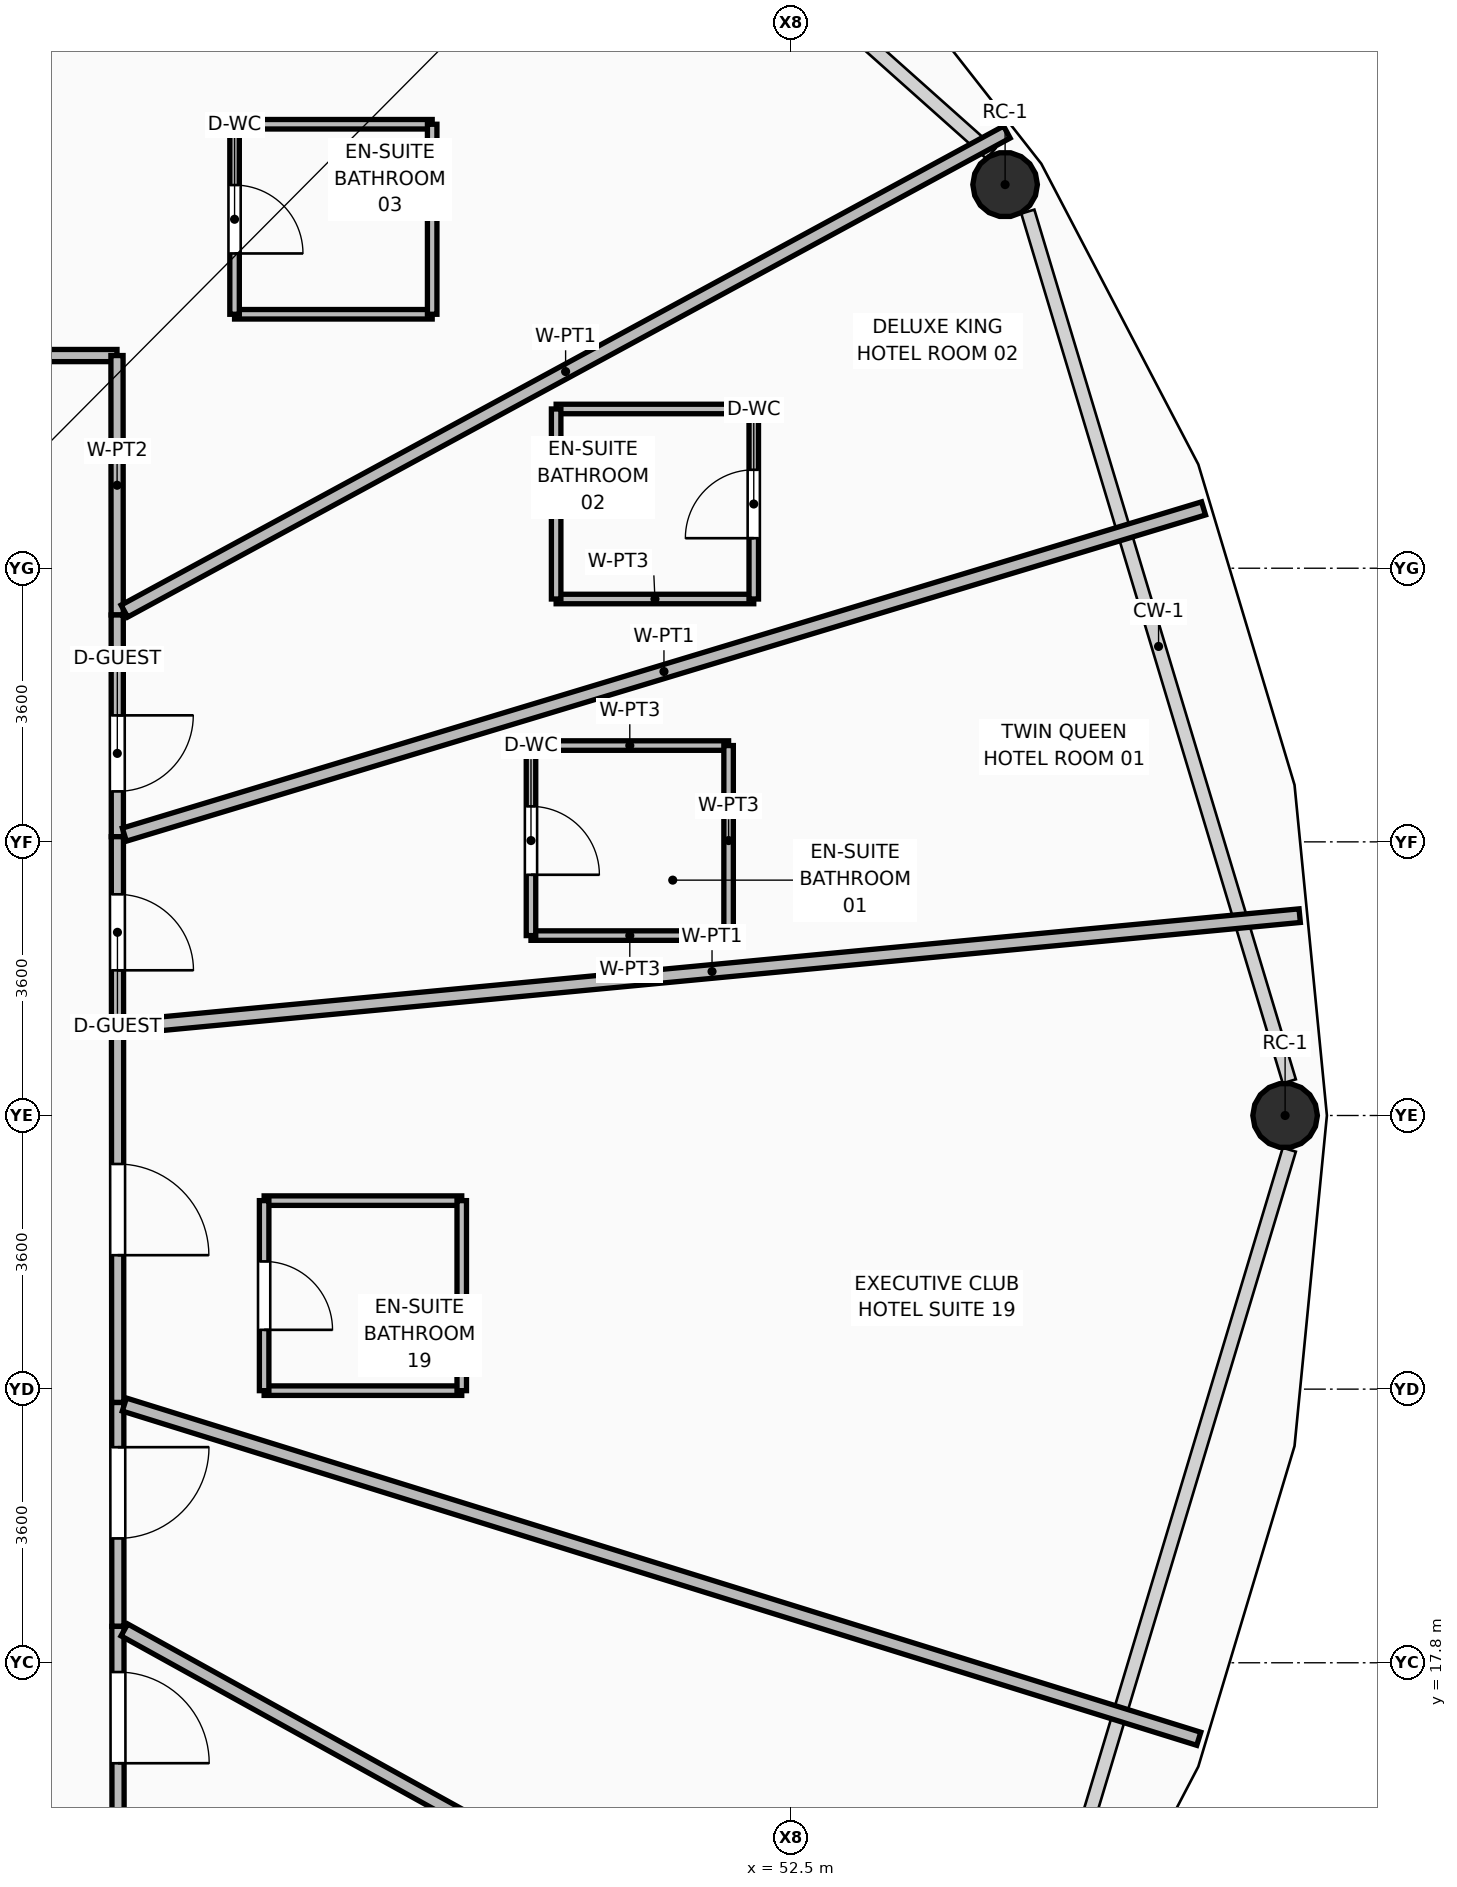
"""IFC4 building model, lengths in metres.
Left out: names, types, materials, properties, quantities, classifications, styles, units other than length and angle.
Written with IfcOpenShell. Run it as: python <this file> out.ifc"""

import sys

from ifc_helpers import new_model, si_unit, direction, frame, frame_2d, origin, origin_2d, place, context, subcontext, project, spatial, rectangle, hollow_circle, extrude, element, fill, save


model = new_model("IFC4")
c1 = context("Model", 3, precision=1e-05, world=origin(), true_north=direction((0.0, 1.0)))
c2 = subcontext(c1, "Body", "Model", "MODEL_VIEW")
j1 = project(units=[si_unit("LENGTHUNIT", "METRE"), si_unit("PLANEANGLEUNIT", "RADIAN")], contexts=[c1])
p1 = place(None, origin())
s1 = spatial("IfcSite", under=j1, at=p1, CompositionType="ELEMENT")
p2 = place(p1, origin())
s2 = spatial("IfcBuilding", under=s1, at=p2, CompositionType="ELEMENT")
p3 = place(p2, frame((0.0, 0.0, 83.25)))
s3 = spatial("IfcBuildingStorey", under=s2, at=p3, CompositionType="ELEMENT", Elevation=83.25)
for number, where, z_axis, x_axis in (
    (1, (59.0, 25.0, 0.0), (0.0, 0.0, 1.0), (1.0, 0.0, 0.0)),
    (2, (55.316, 37.247, 0.0), (0.0, 0.0, 1.0), (1.0, 0.0, 0.0)),
):
    element("IfcColumn", number, at=place(p3, frame(where, z_axis=z_axis, x_axis=x_axis)), inside=s3, PredefinedType="COLUMN", context=c2, shape_type="SweptSolid", body=[
        extrude(hollow_circle(Radius=0.425, WallThickness=0.04, at=origin_2d()), origin(), (0.0, 0.0, 1.0), 3.57),
    ])
p4 = place(p3, frame((38.966, 34.998, 0.0), z_axis=(0.0, 0.0, 1.0), x_axis=(1.0, 0.0, 0.0)))
e3 = element("IfcWall", 3, at=p4, inside=s3, PredefinedType="PARTITIONING", context=c2, shape_type="SweptSolid", body=[
    extrude(rectangle(XDim=4.665, YDim=0.16, at=frame_2d((2.333, 0.0))), origin(), (0.0, 0.0, 1.0), 2.928),
])
p5 = place(p4, frame((0.609, 0.0, 0.0)))
e4 = element("IfcOpeningElement", 4, at=p5, cuts=e3, PredefinedType="OPENING", context=c2, shape_type="SweptSolid", body=[
    extrude(rectangle(XDim=1.2, YDim=2.1, at=frame_2d((0.6, 1.05))), frame((0.0, 0.09, 0.0), z_axis=(0.0, -1.0, 0.0), x_axis=(1.0, 0.0, 0.0)), (0.0, 0.0, 1.0), 0.18),
])
p6 = place(p3, frame((43.631, 34.998, 0.0), z_axis=(0.0, 0.0, 1.0), x_axis=(0.000858368782, -0.999999631601, 0.0)))
e5 = element("IfcWall", 5, at=p6, inside=s3, PredefinedType="PARTITIONING", context=c2, shape_type="SweptSolid", body=[
    extrude(rectangle(XDim=3.413, YDim=0.16, at=frame_2d((1.707, 0.0))), origin(), (0.0, 0.0, 1.0), 2.928),
])
p7 = place(p3, frame((43.634, 31.585, 0.0), z_axis=(0.0, 0.0, 1.0), x_axis=(0.000669567978, -0.999999775839, 0.0)))
e6 = element("IfcWall", 6, at=p7, inside=s3, PredefinedType="PARTITIONING", context=c2, shape_type="SweptSolid", body=[
    extrude(rectangle(XDim=2.917, YDim=0.16, at=frame_2d((1.458, 0.0))), origin(), (0.0, 0.0, 1.0), 3.55),
])
p8 = place(p7, frame((1.321, 0.0, 0.0)))
e7 = element("IfcOpeningElement", 7, at=p8, cuts=e6, PredefinedType="OPENING", context=c2, shape_type="SweptSolid", body=[
    extrude(rectangle(XDim=1.0, YDim=2.1, at=frame_2d((0.5, 1.05))), frame((0.0, 0.09, 0.0), z_axis=(0.0, -1.0, 0.0), x_axis=(1.0, 0.0, 0.0)), (0.0, 0.0, 1.0), 0.18),
])
p9 = place(p3, frame((43.636, 28.668, 0.0), z_axis=(0.0, 0.0, 1.0), x_axis=(0.00077632194, -0.999999698662, 0.0)))
e8 = element("IfcWall", 8, at=p9, inside=s3, PredefinedType="PARTITIONING", context=c2, shape_type="SweptSolid", body=[
    extrude(rectangle(XDim=2.516, YDim=0.16, at=frame_2d((1.258, 0.0))), origin(), (0.0, 0.0, 1.0), 3.55),
])
p10 = place(p9, frame((0.758, 0.0, 0.0)))
e9 = element("IfcOpeningElement", 9, at=p10, cuts=e8, PredefinedType="OPENING", context=c2, shape_type="SweptSolid", body=[
    extrude(rectangle(XDim=1.0, YDim=2.1, at=frame_2d((0.5, 1.05))), frame((0.0, 0.09, 0.0), z_axis=(0.0, -1.0, 0.0), x_axis=(1.0, 0.0, 0.0)), (0.0, 0.0, 1.0), 0.18),
])
p11 = place(p3, frame((43.638, 26.152, 0.0), z_axis=(0.0, 0.0, 1.0), x_axis=(0.000644042472, -0.999999792605, 0.0)))
e10 = element("IfcWall", 10, at=p11, inside=s3, PredefinedType="PARTITIONING", context=c2, shape_type="SweptSolid", body=[
    extrude(rectangle(XDim=4.928, YDim=0.16, at=frame_2d((2.464, 0.0))), origin(), (0.0, 0.0, 1.0), 2.928),
])
p12 = place(p11, frame((1.79, 0.0, 0.0)))
e11 = element("IfcOpeningElement", 11, at=p12, cuts=e10, PredefinedType="OPENING", context=c2, shape_type="SweptSolid", body=[
    extrude(rectangle(XDim=1.2, YDim=2.1, at=frame_2d((0.6, 1.05))), frame((0.0, 0.09, 0.0), z_axis=(0.0, -1.0, 0.0), x_axis=(1.0, 0.0, 0.0)), (0.0, 0.0, 1.0), 0.18),
])
p13 = place(p3, frame((43.641, 21.224, 0.0), z_axis=(0.0, 0.0, 1.0), x_axis=(0.0006631848, -0.999999780093, 0.0)))
e12 = element("IfcWall", 12, at=p13, inside=s3, PredefinedType="PARTITIONING", context=c2, shape_type="SweptSolid", body=[
    extrude(rectangle(XDim=2.945, YDim=0.16, at=frame_2d((1.473, 0.0))), origin(), (0.0, 0.0, 1.0), 2.928),
])
p14 = place(p13, frame((0.588, 0.0, 0.0)))
e13 = element("IfcOpeningElement", 13, at=p14, cuts=e12, PredefinedType="OPENING", context=c2, shape_type="SweptSolid", body=[
    extrude(rectangle(XDim=1.2, YDim=2.1, at=frame_2d((0.6, 1.05))), frame((0.0, 0.09, 0.0), z_axis=(0.0, -1.0, 0.0), x_axis=(1.0, 0.0, 0.0)), (0.0, 0.0, 1.0), 0.18),
])
p15 = place(p3, frame((43.643, 18.279, 0.0), z_axis=(0.0, 0.0, 1.0), x_axis=(0.000756429436, -0.999999713907, 0.0)))
e14 = element("IfcWall", 14, at=p15, inside=s3, PredefinedType="PARTITIONING", context=c2, shape_type="SweptSolid", body=[
    extrude(rectangle(XDim=3.873, YDim=0.16, at=frame_2d((1.937, 0.0))), origin(), (0.0, 0.0, 1.0), 2.928),
])
p16 = place(p15, frame((0.601, 0.0, 0.0)))
e15 = element("IfcOpeningElement", 15, at=p16, cuts=e14, PredefinedType="OPENING", context=c2, shape_type="SweptSolid", body=[
    extrude(rectangle(XDim=1.2, YDim=2.1, at=frame_2d((0.6, 1.05))), frame((0.0, 0.09, 0.0), z_axis=(0.0, -1.0, 0.0), x_axis=(1.0, 0.0, 0.0)), (0.0, 0.0, 1.0), 0.18),
])
p17 = place(p3, frame((43.728, 26.161, 0.0), z_axis=(0.0, 0.0, 1.0), x_axis=(0.995524176843, 0.094507213062, 0.0)))
e16 = element("IfcWall", 16, at=p17, inside=s3, PredefinedType="PARTITIONING", context=c2, shape_type="SweptSolid", body=[
    extrude(rectangle(XDim=15.533, YDim=0.18, at=frame_2d((7.767, 0.0))), origin(), (0.0, 0.0, 1.0), 2.775),
])
p18 = place(p3, frame((43.728, 28.695, 0.0), z_axis=(0.0, 0.0, 1.0), x_axis=(0.957224891777, 0.289344961183, 0.0)))
e17 = element("IfcWall", 17, at=p18, inside=s3, PredefinedType="PARTITIONING", context=c2, shape_type="SweptSolid", body=[
    extrude(rectangle(XDim=14.833, YDim=0.18, at=frame_2d((7.417, 0.0))), origin(), (0.0, 0.0, 1.0), 2.775),
])
p19 = place(p3, frame((43.728, 31.636, 0.0), z_axis=(0.0, 0.0, 1.0), x_axis=(0.878890179317, 0.477024163643, 0.0)))
e18 = element("IfcWall", 18, at=p19, inside=s3, PredefinedType="PARTITIONING", context=c2, shape_type="SweptSolid", body=[
    extrude(rectangle(XDim=13.211, YDim=0.18, at=frame_2d((6.605, 0.0))), origin(), (0.0, 0.0, 1.0), 2.775),
])
p20 = place(p3, frame((39.026, 35.078, 0.0), z_axis=(0.0, 0.0, 1.0), x_axis=(0.598366758348, 0.801222330258, 0.0)))
e19 = element("IfcWall", 19, at=p20, inside=s3, PredefinedType="PARTITIONING", context=c2, shape_type="SweptSolid", body=[
    extrude(rectangle(XDim=13.236, YDim=0.18, at=frame_2d((6.618, 0.0))), origin(), (0.0, 0.0, 1.0), 2.775),
])
p21 = place(p3, frame((43.728, 18.232, 0.0), z_axis=(0.0, 0.0, 1.0), x_axis=(0.874929134989, -0.484250977022, 0.0)))
e20 = element("IfcWall", 20, at=p21, inside=s3, PredefinedType="PARTITIONING", context=c2, shape_type="SweptSolid", body=[
    extrude(rectangle(XDim=13.111, YDim=0.18, at=frame_2d((6.555, 0.0))), origin(), (0.0, 0.0, 1.0), 2.775),
])
p22 = place(p3, frame((43.728, 21.197, 0.0), z_axis=(0.0, 0.0, 1.0), x_axis=(0.954873823144, -0.297011753766, 0.0)))
e21 = element("IfcWall", 21, at=p22, inside=s3, PredefinedType="PARTITIONING", context=c2, shape_type="SweptSolid", body=[
    extrude(rectangle(XDim=14.804, YDim=0.18, at=frame_2d((7.402, 0.0))), origin(), (0.0, 0.0, 1.0), 2.775),
])
for number, where, z_axis, x_axis in (
    (22, (49.078, 27.367, 0.0), (0.0, 0.0, 1.0), (1.0, 0.0, 0.0)),
    (23, (49.078, 29.867, 0.0), (0.0, 0.0, 1.0), (1.0, 0.0, 0.0)),
):
    element("IfcWall", number, at=place(p3, frame(where, z_axis=z_axis, x_axis=x_axis)), inside=s3, PredefinedType="PARTITIONING", context=c2, shape_type="SweptSolid", body=[
        extrude(rectangle(XDim=2.6, YDim=0.125, at=frame_2d((1.3, 0.0))), origin(), (0.0, 0.0, 1.0), 3.55),
    ])
p23 = place(p3, frame((49.078, 27.367, 0.0), z_axis=(0.0, 0.0, 1.0), x_axis=(0.0, 1.0, 0.0)))
e24 = element("IfcWall", 24, at=p23, inside=s3, PredefinedType="PARTITIONING", context=c2, shape_type="SweptSolid", body=[
    extrude(rectangle(XDim=2.5, YDim=0.125, at=frame_2d((1.25, 0.0))), origin(), (0.0, 0.0, 1.0), 3.55),
])
p24 = place(p23, frame((0.8, 0.0, 0.0)))
e25 = element("IfcOpeningElement", 25, at=p24, cuts=e24, PredefinedType="OPENING", context=c2, shape_type="SweptSolid", body=[
    extrude(rectangle(XDim=0.9, YDim=2.1, at=frame_2d((0.45, 1.05))), frame((0.0, 0.073, 0.0), z_axis=(0.0, -1.0, 0.0), x_axis=(1.0, 0.0, 0.0)), (0.0, 0.0, 1.0), 0.145),
])
p25 = place(p3, frame((51.678, 27.367, 0.0), z_axis=(0.0, 0.0, 1.0), x_axis=(0.0, 1.0, 0.0)))
e26 = element("IfcWall", 26, at=p25, inside=s3, PredefinedType="PARTITIONING", context=c2, shape_type="SweptSolid", body=[
    extrude(rectangle(XDim=2.5, YDim=0.125, at=frame_2d((1.25, 0.0))), origin(), (0.0, 0.0, 1.0), 3.55),
])
for number, where, z_axis, x_axis in (
    (27, (49.409, 31.795, 0.0), (0.0, 0.0, 1.0), (1.0, 0.0, 0.0)),
    (28, (49.409, 34.295, 0.0), (0.0, 0.0, 1.0), (1.0, 0.0, 0.0)),
):
    element("IfcWall", number, at=place(p3, frame(where, z_axis=z_axis, x_axis=x_axis)), inside=s3, PredefinedType="PARTITIONING", context=c2, shape_type="SweptSolid", body=[
        extrude(rectangle(XDim=2.6, YDim=0.125, at=frame_2d((1.3, 0.0))), origin(), (0.0, 0.0, 1.0), 3.55),
    ])
p26 = place(p3, frame((49.409, 31.795, 0.0), z_axis=(0.0, 0.0, 1.0), x_axis=(0.0, 1.0, 0.0)))
e29 = element("IfcWall", 29, at=p26, inside=s3, PredefinedType="PARTITIONING", context=c2, shape_type="SweptSolid", body=[
    extrude(rectangle(XDim=2.5, YDim=0.125, at=frame_2d((1.25, 0.0))), origin(), (0.0, 0.0, 1.0), 3.55),
])
p27 = place(p3, frame((52.009, 31.795, 0.0), z_axis=(0.0, 0.0, 1.0), x_axis=(0.0, 1.0, 0.0)))
e30 = element("IfcWall", 30, at=p27, inside=s3, PredefinedType="PARTITIONING", context=c2, shape_type="SweptSolid", body=[
    extrude(rectangle(XDim=2.5, YDim=0.125, at=frame_2d((1.25, 0.0))), origin(), (0.0, 0.0, 1.0), 3.55),
])
p28 = place(p27, frame((0.8, 0.0, 0.0)))
e31 = element("IfcOpeningElement", 31, at=p28, cuts=e30, PredefinedType="OPENING", context=c2, shape_type="SweptSolid", body=[
    extrude(rectangle(XDim=0.9, YDim=2.1, at=frame_2d((0.45, 1.05))), frame((0.0, 0.073, 0.0), z_axis=(0.0, -1.0, 0.0), x_axis=(1.0, 0.0, 0.0)), (0.0, 0.0, 1.0), 0.145),
])
for number, where, z_axis, x_axis in (
    (32, (45.178, 35.541, 0.0), (0.0, 0.0, 1.0), (1.0, 0.0, 0.0)),
    (33, (45.178, 38.041, 0.0), (0.0, 0.0, 1.0), (1.0, 0.0, 0.0)),
):
    element("IfcWall", number, at=place(p3, frame(where, z_axis=z_axis, x_axis=x_axis)), inside=s3, PredefinedType="PARTITIONING", context=c2, shape_type="SweptSolid", body=[
        extrude(rectangle(XDim=2.6, YDim=0.125, at=frame_2d((1.3, 0.0))), origin(), (0.0, 0.0, 1.0), 3.55),
    ])
p29 = place(p3, frame((45.178, 35.541, 0.0), z_axis=(0.0, 0.0, 1.0), x_axis=(0.0, 1.0, 0.0)))
e34 = element("IfcWall", 34, at=p29, inside=s3, PredefinedType="PARTITIONING", context=c2, shape_type="SweptSolid", body=[
    extrude(rectangle(XDim=2.5, YDim=0.125, at=frame_2d((1.25, 0.0))), origin(), (0.0, 0.0, 1.0), 3.55),
])
p30 = place(p29, frame((0.8, 0.0, 0.0)))
e35 = element("IfcOpeningElement", 35, at=p30, cuts=e34, PredefinedType="OPENING", context=c2, shape_type="SweptSolid", body=[
    extrude(rectangle(XDim=0.9, YDim=2.1, at=frame_2d((0.45, 1.05))), frame((0.0, 0.073, 0.0), z_axis=(0.0, -1.0, 0.0), x_axis=(1.0, 0.0, 0.0)), (0.0, 0.0, 1.0), 0.145),
])
p31 = place(p3, frame((47.778, 35.541, 0.0), z_axis=(0.0, 0.0, 1.0), x_axis=(0.0, 1.0, 0.0)))
e36 = element("IfcWall", 36, at=p31, inside=s3, PredefinedType="PARTITIONING", context=c2, shape_type="SweptSolid", body=[
    extrude(rectangle(XDim=2.5, YDim=0.125, at=frame_2d((1.25, 0.0))), origin(), (0.0, 0.0, 1.0), 3.55),
])
p32 = place(p3, frame((45.567, 21.38, 0.0), z_axis=(0.0, 0.0, 1.0), x_axis=(1.0, 0.0, 0.0)))
e37 = element("IfcWall", 37, at=p32, inside=s3, PredefinedType="PARTITIONING", context=c2, shape_type="SweptSolid", body=[
    extrude(rectangle(XDim=2.6, YDim=0.125, at=frame_2d((1.3, 0.0))), origin(), (0.0, 0.0, 1.0), 2.928),
])
p33 = place(p3, frame((45.567, 23.88, 0.0), z_axis=(0.0, 0.0, 1.0), x_axis=(1.0, 0.0, 0.0)))
e38 = element("IfcWall", 38, at=p33, inside=s3, PredefinedType="PARTITIONING", context=c2, shape_type="SweptSolid", body=[
    extrude(rectangle(XDim=2.6, YDim=0.125, at=frame_2d((1.3, 0.0))), origin(), (0.0, 0.0, 1.0), 3.55),
])
p34 = place(p3, frame((45.567, 21.38, 0.0), z_axis=(0.0, 0.0, 1.0), x_axis=(0.0, 1.0, 0.0)))
e39 = element("IfcWall", 39, at=p34, inside=s3, PredefinedType="PARTITIONING", context=c2, shape_type="SweptSolid", body=[
    extrude(rectangle(XDim=2.5, YDim=0.125, at=frame_2d((1.25, 0.0))), origin(), (0.0, 0.0, 1.0), 2.928),
])
p35 = place(p34, frame((0.8, 0.0, 0.0)))
e40 = element("IfcOpeningElement", 40, at=p35, cuts=e39, PredefinedType="OPENING", context=c2, shape_type="SweptSolid", body=[
    extrude(rectangle(XDim=0.9, YDim=2.1, at=frame_2d((0.45, 1.05))), frame((0.0, 0.073, 0.0), z_axis=(0.0, -1.0, 0.0), x_axis=(1.0, 0.0, 0.0)), (0.0, 0.0, 1.0), 0.145),
])
p36 = place(p3, frame((48.167, 21.38, 0.0), z_axis=(0.0, 0.0, 1.0), x_axis=(0.0, 1.0, 0.0)))
e41 = element("IfcWall", 41, at=p36, inside=s3, PredefinedType="PARTITIONING", context=c2, shape_type="SweptSolid", body=[
    extrude(rectangle(XDim=2.5, YDim=0.125, at=frame_2d((1.25, 0.0))), origin(), (0.0, 0.0, 1.0), 2.928),
])
p37 = place(p24, frame((0.9, 0.0, 0.0), z_axis=(0.0, 0.0, 1.0), x_axis=(-1.0, 0.0, 0.0)))
e42 = element("IfcDoor", 42, at=p37, inside=s3, OperationType="SINGLE_SWING_RIGHT", PredefinedType="DOOR", context=c2, shape_type="SweptSolid", body=[
    extrude(rectangle(XDim=0.9, YDim=2.1, at=frame_2d((0.45, 1.05))), frame((0.0, 0.025, 0.0), z_axis=(0.0, -1.0, 0.0), x_axis=(1.0, 0.0, 0.0)), (0.0, 0.0, 1.0), 0.05),
])
fill(e25, e42)
p38 = place(p10, origin())
e43 = element("IfcDoor", 43, at=p38, inside=s3, OperationType="SINGLE_SWING_RIGHT", PredefinedType="DOOR", context=c2, shape_type="SweptSolid", body=[
    extrude(rectangle(XDim=1.0, YDim=2.1, at=frame_2d((0.5, 1.05))), frame((0.0, 0.025, 0.0), z_axis=(0.0, -1.0, 0.0), x_axis=(1.0, 0.0, 0.0)), (0.0, 0.0, 1.0), 0.05),
])
fill(e9, e43)
p39 = place(p28, origin())
e44 = element("IfcDoor", 44, at=p39, inside=s3, OperationType="SINGLE_SWING_LEFT", PredefinedType="DOOR", context=c2, shape_type="SweptSolid", body=[
    extrude(rectangle(XDim=0.9, YDim=2.1, at=frame_2d((0.45, 1.05))), frame((0.0, 0.025, 0.0), z_axis=(0.0, -1.0, 0.0), x_axis=(1.0, 0.0, 0.0)), (0.0, 0.0, 1.0), 0.05),
])
fill(e31, e44)
p40 = place(p8, origin())
e45 = element("IfcDoor", 45, at=p40, inside=s3, OperationType="SINGLE_SWING_LEFT", PredefinedType="DOOR", context=c2, shape_type="SweptSolid", body=[
    extrude(rectangle(XDim=1.0, YDim=2.1, at=frame_2d((0.5, 1.05))), frame((0.0, 0.025, 0.0), z_axis=(0.0, -1.0, 0.0), x_axis=(1.0, 0.0, 0.0)), (0.0, 0.0, 1.0), 0.05),
])
fill(e7, e45)
p41 = place(p30, frame((0.9, 0.0, 0.0), z_axis=(0.0, 0.0, 1.0), x_axis=(-1.0, 0.0, 0.0)))
e46 = element("IfcDoor", 46, at=p41, inside=s3, OperationType="SINGLE_SWING_RIGHT", PredefinedType="DOOR", context=c2, shape_type="SweptSolid", body=[
    extrude(rectangle(XDim=0.9, YDim=2.1, at=frame_2d((0.45, 1.05))), frame((0.0, 0.025, 0.0), z_axis=(0.0, -1.0, 0.0), x_axis=(1.0, 0.0, 0.0)), (0.0, 0.0, 1.0), 0.05),
])
fill(e35, e46)
p42 = place(p16, origin())
e47 = element("IfcDoor", 47, at=p42, inside=s3, OperationType="SINGLE_SWING_RIGHT", PredefinedType="DOOR", context=c2, shape_type="SweptSolid", body=[
    extrude(rectangle(XDim=1.2, YDim=2.1, at=frame_2d((0.6, 1.05))), frame((0.0, 0.025, 0.0), z_axis=(0.0, -1.0, 0.0), x_axis=(1.0, 0.0, 0.0)), (0.0, 0.0, 1.0), 0.05),
])
fill(e15, e47)
p43 = place(p14, origin())
e48 = element("IfcDoor", 48, at=p43, inside=s3, OperationType="SINGLE_SWING_LEFT", PredefinedType="DOOR", context=c2, shape_type="SweptSolid", body=[
    extrude(rectangle(XDim=1.2, YDim=2.1, at=frame_2d((0.6, 1.05))), frame((0.0, 0.025, 0.0), z_axis=(0.0, -1.0, 0.0), x_axis=(1.0, 0.0, 0.0)), (0.0, 0.0, 1.0), 0.05),
])
fill(e13, e48)
p44 = place(p35, frame((0.9, 0.0, 0.0), z_axis=(0.0, 0.0, 1.0), x_axis=(-1.0, 0.0, 0.0)))
e49 = element("IfcDoor", 49, at=p44, inside=s3, OperationType="SINGLE_SWING_RIGHT", PredefinedType="DOOR", context=c2, shape_type="SweptSolid", body=[
    extrude(rectangle(XDim=0.9, YDim=2.1, at=frame_2d((0.45, 1.05))), frame((0.0, 0.025, 0.0), z_axis=(0.0, -1.0, 0.0), x_axis=(1.0, 0.0, 0.0)), (0.0, 0.0, 1.0), 0.05),
])
fill(e40, e49)
p45 = place(p12, origin())
e50 = element("IfcDoor", 50, at=p45, inside=s3, OperationType="SINGLE_SWING_RIGHT", PredefinedType="DOOR", context=c2, shape_type="SweptSolid", body=[
    extrude(rectangle(XDim=1.2, YDim=2.1, at=frame_2d((0.6, 1.05))), frame((0.0, 0.025, 0.0), z_axis=(0.0, -1.0, 0.0), x_axis=(1.0, 0.0, 0.0)), (0.0, 0.0, 1.0), 0.05),
])
fill(e11, e50)
save(model, sys.argv[1])
